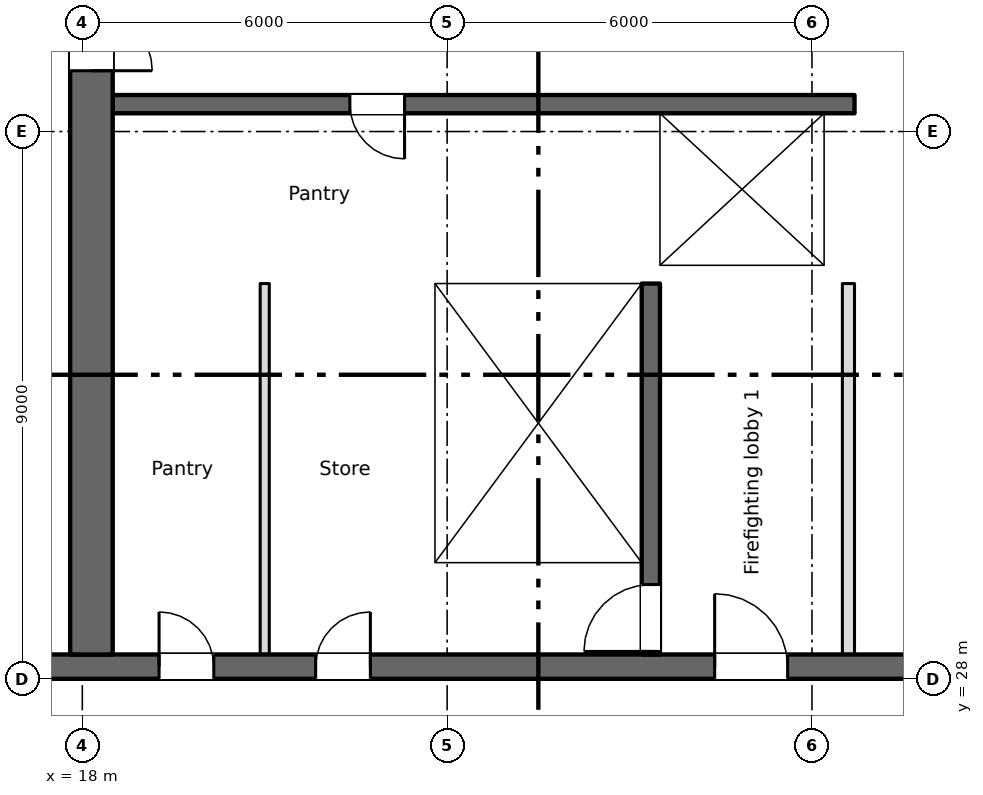
"""IFC4 building model, lengths in metres.
Left out: names, types, materials, properties, quantities, classifications, styles, units other than length and angle.
Written with IfcOpenShell. Run it as: python <this file> out.ifc"""

import sys

from ifc_helpers import new_model, si_unit, direction, frame, frame_2d, origin, place, context, subcontext, project, spatial, rectangle, extrude, element, fill, save


model = new_model("IFC4")
c1 = context("Model", 3, precision=1e-05, world=origin(), true_north=direction((0.0, 1.0)))
c2 = subcontext(c1, "Body", "Model", "MODEL_VIEW")
j1 = project(units=[si_unit("LENGTHUNIT", "METRE"), si_unit("PLANEANGLEUNIT", "RADIAN")], contexts=[c1])
p1 = place(None, origin())
s1 = spatial("IfcSite", under=j1, at=p1, CompositionType="ELEMENT")
p2 = place(p1, origin())
s2 = spatial("IfcBuilding", under=s1, at=p2, CompositionType="ELEMENT")
p3 = place(p2, frame((0.0, 0.0, 166.75)))
s3 = spatial("IfcBuildingStorey", under=s2, at=p3, CompositionType="ELEMENT", Elevation=166.75)
p4 = place(p3, frame((6.6, 28.2, 0.0), z_axis=(0.0, 0.0, 1.0), x_axis=(1.0, 0.0, 0.0)))
e1 = element("IfcWall", 1, at=p4, inside=s3, PredefinedType="SHEAR", context=c2, shape_type="SweptSolid", body=[
    extrude(rectangle(XDim=57.9, YDim=0.4, at=frame_2d((28.95, 0.0))), origin(), (0.0, 0.0, 1.0), 3.35),
])
p5 = place(p4, frame((12.663, 0.0, 0.0)))
e2 = element("IfcOpeningElement", 2, at=p5, cuts=e1, PredefinedType="OPENING", context=c2, shape_type="SweptSolid", body=[
    extrude(rectangle(XDim=0.9, YDim=2.1, at=frame_2d((0.45, 1.05))), frame((0.0, 0.21, 0.0), z_axis=(0.0, -1.0, 0.0), x_axis=(1.0, 0.0, 0.0)), (0.0, 0.0, 1.0), 0.42),
])
p6 = place(p4, frame((15.238, 0.0, 0.0)))
e3 = element("IfcOpeningElement", 3, at=p6, cuts=e1, PredefinedType="OPENING", context=c2, shape_type="SweptSolid", body=[
    extrude(rectangle(XDim=0.9, YDim=2.1, at=frame_2d((0.45, 1.05))), frame((0.0, 0.21, 0.0), z_axis=(0.0, -1.0, 0.0), x_axis=(1.0, 0.0, 0.0)), (0.0, 0.0, 1.0), 0.42),
])
p7 = place(p4, frame((49.95, 0.0, 0.0)))
e4 = element("IfcOpeningElement", 4, at=p7, cuts=e1, PredefinedType="OPENING", context=c2, shape_type="SweptSolid", body=[
    extrude(rectangle(XDim=0.9, YDim=2.1, at=frame_2d((0.45, 1.05))), frame((0.0, 0.21, 0.0), z_axis=(0.0, -1.0, 0.0), x_axis=(1.0, 0.0, 0.0)), (0.0, 0.0, 1.0), 0.42),
])
p8 = place(p4, frame((0.663, 0.0, 0.0)))
e5 = element("IfcOpeningElement", 5, at=p8, cuts=e1, PredefinedType="OPENING", context=c2, shape_type="SweptSolid", body=[
    extrude(rectangle(XDim=0.9, YDim=2.1, at=frame_2d((0.45, 1.05))), frame((0.0, 0.21, 0.0), z_axis=(0.0, -1.0, 0.0), x_axis=(1.0, 0.0, 0.0)), (0.0, 0.0, 1.0), 0.42),
])
p9 = place(p4, frame((2.238, 0.0, 0.0)))
e6 = element("IfcOpeningElement", 6, at=p9, cuts=e1, PredefinedType="OPENING", context=c2, shape_type="SweptSolid", body=[
    extrude(rectangle(XDim=0.9, YDim=2.1, at=frame_2d((0.45, 1.05))), frame((0.0, 0.21, 0.0), z_axis=(0.0, -1.0, 0.0), x_axis=(1.0, 0.0, 0.0)), (0.0, 0.0, 1.0), 0.42),
])
p10 = place(p4, frame((4.8, 0.0, 0.0)))
e7 = element("IfcOpeningElement", 7, at=p10, cuts=e1, PredefinedType="OPENING", context=c2, shape_type="SweptSolid", body=[
    extrude(rectangle(XDim=1.2, YDim=2.1, at=frame_2d((0.6, 1.05))), frame((0.0, 0.21, 0.0), z_axis=(0.0, -1.0, 0.0), x_axis=(1.0, 0.0, 0.0)), (0.0, 0.0, 1.0), 0.42),
])
p11 = place(p4, frame((31.8, 0.0, 0.0)))
e8 = element("IfcOpeningElement", 8, at=p11, cuts=e1, PredefinedType="OPENING", context=c2, shape_type="SweptSolid", body=[
    extrude(rectangle(XDim=1.2, YDim=2.1, at=frame_2d((0.6, 1.05))), frame((0.0, 0.21, 0.0), z_axis=(0.0, -1.0, 0.0), x_axis=(1.0, 0.0, 0.0)), (0.0, 0.0, 1.0), 0.42),
])
p12 = place(p4, frame((55.3, 0.0, 0.0)))
e9 = element("IfcOpeningElement", 9, at=p12, cuts=e1, PredefinedType="OPENING", context=c2, shape_type="SweptSolid", body=[
    extrude(rectangle(XDim=1.2, YDim=2.1, at=frame_2d((0.6, 1.05))), frame((0.0, 0.21, 0.0), z_axis=(0.0, -1.0, 0.0), x_axis=(1.0, 0.0, 0.0)), (0.0, 0.0, 1.0), 0.42),
])
p13 = place(p4, frame((21.8, 0.0, 0.0)))
e10 = element("IfcOpeningElement", 10, at=p13, cuts=e1, PredefinedType="OPENING", context=c2, shape_type="SweptSolid", body=[
    extrude(rectangle(XDim=1.2, YDim=2.1, at=frame_2d((0.6, 1.05))), frame((0.0, 0.21, 0.0), z_axis=(0.0, -1.0, 0.0), x_axis=(1.0, 0.0, 0.0)), (0.0, 0.0, 1.0), 0.42),
])
p14 = place(p4, frame((41.8, 0.0, 0.0)))
e11 = element("IfcOpeningElement", 11, at=p14, cuts=e1, PredefinedType="OPENING", context=c2, shape_type="SweptSolid", body=[
    extrude(rectangle(XDim=1.2, YDim=2.1, at=frame_2d((0.6, 1.05))), frame((0.0, 0.21, 0.0), z_axis=(0.0, -1.0, 0.0), x_axis=(1.0, 0.0, 0.0)), (0.0, 0.0, 1.0), 0.42),
])
p15 = place(p4, frame((24.95, 0.0, 0.0)))
e12 = element("IfcOpeningElement", 12, at=p15, cuts=e1, PredefinedType="OPENING", context=c2, shape_type="SweptSolid", body=[
    extrude(rectangle(XDim=2.4, YDim=2.1, at=frame_2d((1.2, 1.05))), frame((0.0, 0.21, 0.0), z_axis=(0.0, -1.0, 0.0), x_axis=(1.0, 0.0, 0.0)), (0.0, 0.0, 1.0), 0.42),
])
p16 = place(p4, frame((37.45, 0.0, 0.0)))
e13 = element("IfcOpeningElement", 13, at=p16, cuts=e1, PredefinedType="OPENING", context=c2, shape_type="SweptSolid", body=[
    extrude(rectangle(XDim=2.4, YDim=2.1, at=frame_2d((1.2, 1.05))), frame((0.0, 0.21, 0.0), z_axis=(0.0, -1.0, 0.0), x_axis=(1.0, 0.0, 0.0)), (0.0, 0.0, 1.0), 0.42),
])
p17 = place(p4, frame((8.1, 0.0, 0.0)))
e14 = element("IfcOpeningElement", 14, at=p17, cuts=e1, PredefinedType="OPENING", context=c2, shape_type="SweptSolid", body=[
    extrude(rectangle(XDim=2.4, YDim=2.1, at=frame_2d((1.2, 1.05))), frame((0.0, 0.21, 0.0), z_axis=(0.0, -1.0, 0.0), x_axis=(1.0, 0.0, 0.0)), (0.0, 0.0, 1.0), 0.42),
])
p18 = place(p4, frame((28.95, 0.0, 0.0)))
e15 = element("IfcOpeningElement", 15, at=p18, cuts=e1, PredefinedType="OPENING", context=c2, shape_type="SweptSolid", body=[
    extrude(rectangle(XDim=0.9, YDim=2.1, at=frame_2d((0.45, 1.05))), frame((0.0, 0.21, 0.0), z_axis=(0.0, -1.0, 0.0), x_axis=(1.0, 0.0, 0.0)), (0.0, 0.0, 1.0), 0.42),
])
p19 = place(p4, frame((34.95, 0.0, 0.0)))
e16 = element("IfcOpeningElement", 16, at=p19, cuts=e1, PredefinedType="OPENING", context=c2, shape_type="SweptSolid", body=[
    extrude(rectangle(XDim=0.9, YDim=2.1, at=frame_2d((0.45, 1.05))), frame((0.0, 0.21, 0.0), z_axis=(0.0, -1.0, 0.0), x_axis=(1.0, 0.0, 0.0)), (0.0, 0.0, 1.0), 0.42),
])
p20 = place(p3, frame((18.15, 28.4, 0.0), z_axis=(0.0, 0.0, 1.0), x_axis=(0.0, 1.0, 0.0)))
e17 = element("IfcWall", 17, at=p20, inside=s3, PredefinedType="SHEAR", context=c2, shape_type="SweptSolid", body=[
    extrude(rectangle(XDim=16.9, YDim=0.7, at=frame_2d((8.45, 0.0))), origin(), (0.0, 0.0, 1.0), 3.35),
])
p21 = place(p20, frame((9.6, 0.0, 0.0)))
e18 = element("IfcOpeningElement", 18, at=p21, cuts=e17, PredefinedType="OPENING", context=c2, shape_type="SweptSolid", body=[
    extrude(rectangle(XDim=2.0, YDim=2.1, at=frame_2d((1.0, 1.05))), frame((0.0, 0.36, 0.0), z_axis=(0.0, -1.0, 0.0), x_axis=(1.0, 0.0, 0.0)), (0.0, 0.0, 1.0), 0.72),
])
p22 = place(p20, frame((15.4, 0.0, 0.0)))
e19 = element("IfcOpeningElement", 19, at=p22, cuts=e17, PredefinedType="OPENING", context=c2, shape_type="SweptSolid", body=[
    extrude(rectangle(XDim=1.2, YDim=2.1, at=frame_2d((0.6, 1.05))), frame((0.0, 0.36, 0.0), z_axis=(0.0, -1.0, 0.0), x_axis=(1.0, 0.0, 0.0)), (0.0, 0.0, 1.0), 0.72),
])
p23 = place(p3, frame((23.65, 28.4, 0.0), z_axis=(0.0, 0.0, 1.0), x_axis=(0.0, 1.0, 0.0)))
e20 = element("IfcWall", 20, at=p23, inside=s3, PredefinedType="SHEAR", context=c2, shape_type="SweptSolid", body=[
    extrude(rectangle(XDim=6.1, YDim=0.3, at=frame_2d((3.05, 0.0))), origin(), (0.0, 0.0, 1.0), 3.35),
])
p24 = place(p3, frame((27.35, 28.4, 0.0), z_axis=(0.0, 0.0, 1.0), x_axis=(0.0, 1.0, 0.0)))
e21 = element("IfcWall", 21, at=p24, inside=s3, PredefinedType="SHEAR", context=c2, shape_type="SweptSolid", body=[
    extrude(rectangle(XDim=6.1, YDim=0.3, at=frame_2d((3.05, 0.0))), origin(), (0.0, 0.0, 1.0), 3.35),
])
p25 = place(p24, frame((0.05, 0.0, 0.0)))
e22 = element("IfcOpeningElement", 22, at=p25, cuts=e21, PredefinedType="OPENING", context=c2, shape_type="SweptSolid", body=[
    extrude(rectangle(XDim=1.1, YDim=2.1, at=frame_2d((0.55, 1.05))), frame((0.0, 0.16, 0.0), z_axis=(0.0, -1.0, 0.0), x_axis=(1.0, 0.0, 0.0)), (0.0, 0.0, 1.0), 0.32),
])
p26 = place(p3, frame((18.5, 34.65, 0.0), z_axis=(0.0, 0.0, 1.0), x_axis=(1.0, 0.0, 0.0)))
e23 = element("IfcWall", 23, at=p26, inside=s3, PredefinedType="SHEAR", context=c2, shape_type="SweptSolid", body=[
    extrude(rectangle(XDim=12.2, YDim=0.3, at=frame_2d((6.1, 0.0))), origin(), (0.0, 0.0, 1.0), 3.35),
])
p27 = place(p26, frame((9.8, 0.0, 0.0)))
e24 = element("IfcOpeningElement", 24, at=p27, cuts=e23, PredefinedType="OPENING", context=c2, shape_type="SweptSolid", body=[
    extrude(rectangle(XDim=1.1, YDim=2.1, at=frame_2d((0.55, 1.05))), frame((0.0, 0.16, 0.0), z_axis=(0.0, -1.0, 0.0), x_axis=(1.0, 0.0, 0.0)), (0.0, 0.0, 1.0), 0.32),
])
p28 = place(p3, frame((30.7, 37.45, 0.0), z_axis=(0.0, 0.0, 1.0), x_axis=(-1.0, 0.0, 0.0)))
e25 = element("IfcWall", 25, at=p28, inside=s3, PredefinedType="SHEAR", context=c2, shape_type="SweptSolid", body=[
    extrude(rectangle(XDim=12.2, YDim=0.3, at=frame_2d((6.1, 0.0))), origin(), (0.0, 0.0, 1.0), 3.35),
])
p29 = place(p28, frame((7.4, 0.0, 0.0)))
e26 = element("IfcOpeningElement", 26, at=p29, cuts=e25, PredefinedType="OPENING", context=c2, shape_type="SweptSolid", body=[
    extrude(rectangle(XDim=0.9, YDim=2.1, at=frame_2d((0.45, 1.05))), frame((0.0, 0.16, 0.0), z_axis=(0.0, -1.0, 0.0), x_axis=(1.0, 0.0, 0.0)), (0.0, 0.0, 1.0), 0.32),
])
p30 = place(p3, frame((27.35, 34.8, 0.0), z_axis=(0.0, 0.0, 1.0), x_axis=(0.0, 1.0, 0.0)))
e27 = element("IfcWall", 27, at=p30, inside=s3, PredefinedType="SHEAR", context=c2, shape_type="SweptSolid", body=[
    extrude(rectangle(XDim=2.5, YDim=0.3, at=frame_2d((1.25, 0.0))), origin(), (0.0, 0.0, 1.0), 3.35),
])
p31 = place(p3, frame((30.45, 34.8, 0.0), z_axis=(0.0, 0.0, 1.0), x_axis=(0.0, 1.0, 0.0)))
e28 = element("IfcWall", 28, at=p31, inside=s3, PredefinedType="SHEAR", context=c2, shape_type="SweptSolid", body=[
    extrude(rectangle(XDim=2.5, YDim=0.5, at=frame_2d((1.25, 0.0))), origin(), (0.0, 0.0, 1.0), 3.35),
])
p32 = place(p3, frame((30.6, 28.4, 0.0), z_axis=(0.0, 0.0, 1.0), x_axis=(0.0, 1.0, 0.0)))
e29 = element("IfcWall", 29, at=p32, inside=s3, PredefinedType="PARTITIONING", context=c2, shape_type="SweptSolid", body=[
    extrude(rectangle(XDim=6.1, YDim=0.2, at=frame_2d((3.05, 0.0))), origin(), (0.0, 0.0, 1.0), 3.35),
])
p33 = place(p3, frame((21.0, 28.4, 0.0), z_axis=(0.0, 0.0, 1.0), x_axis=(0.0, 1.0, 0.0)))
e30 = element("IfcWall", 30, at=p33, inside=s3, PredefinedType="PARTITIONING", context=c2, shape_type="SweptSolid", body=[
    extrude(rectangle(XDim=6.1, YDim=0.15, at=frame_2d((3.05, 0.0))), origin(), (0.0, 0.0, 1.0), 3.35),
])
p34 = place(p5, origin())
e31 = element("IfcDoor", 31, at=p34, inside=s3, OperationType="SINGLE_SWING_LEFT", PredefinedType="DOOR", context=c2, shape_type="SweptSolid", body=[
    extrude(rectangle(XDim=0.9, YDim=2.1, at=frame_2d((0.45, 1.05))), frame((0.0, 0.025, 0.0), z_axis=(0.0, -1.0, 0.0), x_axis=(1.0, 0.0, 0.0)), (0.0, 0.0, 1.0), 0.05),
])
fill(e2, e31)
p35 = place(p6, origin())
e32 = element("IfcDoor", 32, at=p35, inside=s3, OperationType="SINGLE_SWING_RIGHT", PredefinedType="DOOR", context=c2, shape_type="SweptSolid", body=[
    extrude(rectangle(XDim=0.9, YDim=2.1, at=frame_2d((0.45, 1.05))), frame((0.0, 0.025, 0.0), z_axis=(0.0, -1.0, 0.0), x_axis=(1.0, 0.0, 0.0)), (0.0, 0.0, 1.0), 0.05),
])
fill(e3, e32)
p36 = place(p29, origin())
e33 = element("IfcDoor", 33, at=p36, inside=s3, OperationType="SINGLE_SWING_LEFT", PredefinedType="DOOR", context=c2, shape_type="SweptSolid", body=[
    extrude(rectangle(XDim=0.9, YDim=2.1, at=frame_2d((0.45, 1.05))), frame((0.0, 0.025, 0.0), z_axis=(0.0, -1.0, 0.0), x_axis=(1.0, 0.0, 0.0)), (0.0, 0.0, 1.0), 0.05),
])
fill(e26, e33)
p37 = place(p27, origin())
e34 = element("IfcDoor", 34, at=p37, inside=s3, OperationType="SLIDING_TO_LEFT", PredefinedType="DOOR", context=c2, shape_type="SweptSolid", body=[
    extrude(rectangle(XDim=1.1, YDim=2.1, at=frame_2d((0.55, 1.05))), frame((0.0, 0.025, 0.0), z_axis=(0.0, -1.0, 0.0), x_axis=(1.0, 0.0, 0.0)), (0.0, 0.0, 1.0), 0.05),
])
fill(e24, e34)
p38 = place(p25, origin())
e35 = element("IfcDoor", 35, at=p38, inside=s3, OperationType="SINGLE_SWING_LEFT", PredefinedType="DOOR", context=c2, shape_type="SweptSolid", body=[
    extrude(rectangle(XDim=1.1, YDim=2.1, at=frame_2d((0.55, 1.05))), frame((0.0, 0.025, 0.0), z_axis=(0.0, -1.0, 0.0), x_axis=(1.0, 0.0, 0.0)), (0.0, 0.0, 1.0), 0.05),
])
fill(e22, e35)
p39 = place(p13, origin())
e36 = element("IfcDoor", 36, at=p39, inside=s3, OperationType="SINGLE_SWING_LEFT", PredefinedType="DOOR", context=c2, shape_type="SweptSolid", body=[
    extrude(rectangle(XDim=1.2, YDim=2.1, at=frame_2d((0.6, 1.05))), frame((0.0, 0.025, 0.0), z_axis=(0.0, -1.0, 0.0), x_axis=(1.0, 0.0, 0.0)), (0.0, 0.0, 1.0), 0.05),
])
fill(e10, e36)
p40 = place(p21, origin())
e37 = element("IfcDoor", 37, at=p40, inside=s3, OperationType="DOUBLE_DOOR_SINGLE_SWING", PredefinedType="DOOR", context=c2, shape_type="SweptSolid", body=[
    extrude(rectangle(XDim=2.0, YDim=2.1, at=frame_2d((1.0, 1.05))), frame((0.0, 0.025, 0.0), z_axis=(0.0, -1.0, 0.0), x_axis=(1.0, 0.0, 0.0)), (0.0, 0.0, 1.0), 0.05),
])
fill(e18, e37)
save(model, sys.argv[1])
